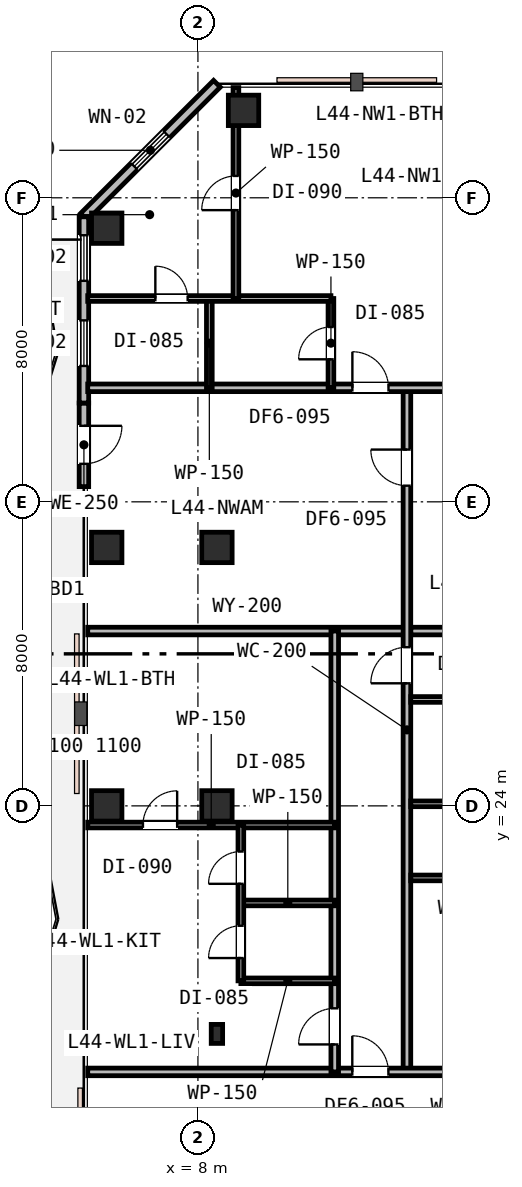
"""IFC4 building model, lengths in metres.
Left out: names, types, materials, properties, quantities, classifications, styles, units other than length and angle.
Written with IfcOpenShell. Run it as: python <this file> out.ifc"""

import sys

from ifc_helpers import new_model, si_unit, direction, frame, frame_2d, origin, origin_2d, place, context, subcontext, project, spatial, rectangle, i_section, extrude, element, fill, save


model = new_model("IFC4")
c1 = context("Model", 3, precision=1e-05, world=origin(), true_north=direction((0.0, 1.0)))
c2 = subcontext(c1, "Body", "Model", "MODEL_VIEW")
j1 = project(units=[si_unit("LENGTHUNIT", "METRE"), si_unit("PLANEANGLEUNIT", "RADIAN")], contexts=[c1])
p1 = place(None, origin())
s1 = spatial("IfcSite", under=j1, at=p1, CompositionType="ELEMENT")
p2 = place(p1, origin())
s2 = spatial("IfcBuilding", under=s1, at=p2, CompositionType="ELEMENT")
p3 = place(p2, frame((0.0, 0.0, 172.2)))
s3 = spatial("IfcBuildingStorey", under=s2, at=p3, CompositionType="ELEMENT", Elevation=172.2)
for number, where, z_axis, x_axis in (
    (1, (8.5, 24.0, 0.0), (0.0, 0.0, 1.0), (1.0, 0.0, 0.0)),
    (2, (5.6, 24.0, 0.0), (0.0, 0.0, 1.0), (1.0, 0.0, 0.0)),
    (3, (5.6, 30.8, 0.0), (0.0, 0.0, 1.0), (1.0, 0.0, 0.0)),
    (4, (5.6, 39.2, 0.0), (0.0, 0.0, 1.0), (1.0, 0.0, 0.0)),
    (5, (8.5, 30.8, 0.0), (0.0, 0.0, 1.0), (1.0, 0.0, 0.0)),
    (6, (9.2, 42.3, 0.0), (0.0, 0.0, 1.0), (1.0, 0.0, 0.0)),
):
    element("IfcColumn", number, at=place(p3, frame(where, z_axis=z_axis, x_axis=x_axis)), inside=s3, PredefinedType="COLUMN", context=c2, shape_type="SweptSolid", body=[
        extrude(rectangle(XDim=0.8, YDim=0.8, at=origin_2d()), origin(), (0.0, 0.0, 1.0), 3.6),
    ])
p4 = place(p3, frame((8.5, 18.0, 0.0), z_axis=(0.0, 0.0, 1.0), x_axis=(1.0, 0.0, 0.0)))
e7 = element("IfcColumn", 7, at=p4, inside=s3, PredefinedType="COLUMN", context=c2, shape_type="SweptSolid", body=[
    extrude(i_section(OverallWidth=0.3, OverallDepth=0.5, WebThickness=0.015, FlangeThickness=0.028, FilletRadius=0.027, at=origin_2d()), origin(), (0.0, 0.0, 1.0), 3.6),
])
p5 = place(p3, frame((8.5, 43.0, 0.0), z_axis=(0.0, 0.0, 1.0), x_axis=(-0.707106781187, -0.707106781187, 0.0)))
e8 = element("IfcWall", 8, at=p5, inside=s3, PredefinedType="STANDARD", context=c2, shape_type="SweptSolid", body=[
    extrude(rectangle(XDim=4.95, YDim=0.25, at=frame_2d((2.475, 0.0))), origin(), (0.0, 0.0, 1.0), 3.33),
])
p6 = place(p5, frame((1.875, 0.0, 0.85)))
e9 = element("IfcOpeningElement", 9, at=p6, cuts=e8, PredefinedType="OPENING", context=c2, shape_type="SweptSolid", body=[
    extrude(rectangle(XDim=1.2, YDim=1.6, at=frame_2d((0.6, 0.8))), frame((0.0, 0.135, 0.0), z_axis=(0.0, -1.0, 0.0), x_axis=(1.0, 0.0, 0.0)), (0.0, 0.0, 1.0), 0.27),
])
p7 = place(p3, frame((5.0, 34.6, 0.0), z_axis=(0.0, 0.0, 1.0), x_axis=(0.0, -1.0, 0.0)))
e10 = element("IfcWall", 10, at=p7, inside=s3, PredefinedType="STANDARD", context=c2, shape_type="SweptSolid", body=[
    extrude(rectangle(XDim=2.2, YDim=0.25, at=frame_2d((1.1, 0.0))), origin(), (0.0, 0.0, 1.0), 3.33),
])
p8 = place(p7, frame((0.6, 0.0, 0.0)))
e11 = element("IfcOpeningElement", 11, at=p8, cuts=e10, PredefinedType="OPENING", context=c2, shape_type="SweptSolid", body=[
    extrude(rectangle(XDim=1.0, YDim=2.15, at=frame_2d((0.5, 1.075))), frame((0.0, 0.135, 0.0), z_axis=(0.0, -1.0, 0.0), x_axis=(1.0, 0.0, 0.0)), (0.0, 0.0, 1.0), 0.27),
])
p9 = place(p3, frame((5.0, 39.5, 0.0), z_axis=(0.0, 0.0, 1.0), x_axis=(0.0, -1.0, 0.0)))
e12 = element("IfcWall", 12, at=p9, inside=s3, PredefinedType="STANDARD", context=c2, shape_type="SweptSolid", body=[
    extrude(rectangle(XDim=4.9, YDim=0.25, at=frame_2d((2.45, 0.0))), origin(), (0.0, 0.0, 1.0), 3.33),
])
p10 = place(p9, frame((0.485, 0.0, 0.85)))
e13 = element("IfcOpeningElement", 13, at=p10, cuts=e12, PredefinedType="OPENING", context=c2, shape_type="SweptSolid", body=[
    extrude(rectangle(XDim=1.2, YDim=1.6, at=frame_2d((0.6, 0.8))), frame((0.0, 0.135, 0.0), z_axis=(0.0, -1.0, 0.0), x_axis=(1.0, 0.0, 0.0)), (0.0, 0.0, 1.0), 0.27),
])
p11 = place(p9, frame((2.725, 0.0, 0.85)))
e14 = element("IfcOpeningElement", 14, at=p11, cuts=e12, PredefinedType="OPENING", context=c2, shape_type="SweptSolid", body=[
    extrude(rectangle(XDim=1.2, YDim=1.6, at=frame_2d((0.6, 0.8))), frame((0.0, 0.135, 0.0), z_axis=(0.0, -1.0, 0.0), x_axis=(1.0, 0.0, 0.0)), (0.0, 0.0, 1.0), 0.27),
])
p12 = place(p3, frame((5.1, 28.6, 0.0), z_axis=(0.0, 0.0, 1.0), x_axis=(1.0, 0.0, 0.0)))
e15 = element("IfcWall", 15, at=p12, inside=s3, PredefinedType="PARTITIONING", context=c2, shape_type="SweptSolid", body=[
    extrude(rectangle(XDim=8.4, YDim=0.2, at=frame_2d((4.2, 0.0))), origin(), (0.0, 0.0, 1.0), 2.92),
])
p13 = place(p3, frame((13.6, 28.6, 0.0), z_axis=(0.0, 0.0, 1.0), x_axis=(1.0, 0.0, 0.0)))
e16 = element("IfcWall", 16, at=p13, inside=s3, PredefinedType="PARTITIONING", context=c2, shape_type="SweptSolid", body=[
    extrude(rectangle(XDim=37.3, YDim=0.2, at=frame_2d((18.65, 0.0))), origin(), (0.0, 0.0, 1.0), 2.92),
])
p14 = place(p13, frame((16.025, 0.0, 0.0)))
e17 = element("IfcOpeningElement", 17, at=p14, cuts=e16, PredefinedType="OPENING", context=c2, shape_type="SweptSolid", body=[
    extrude(rectangle(XDim=0.95, YDim=2.15, at=frame_2d((0.475, 1.075))), frame((0.0, 0.11, 0.0), z_axis=(0.0, -1.0, 0.0), x_axis=(1.0, 0.0, 0.0)), (0.0, 0.0, 1.0), 0.22),
])
p15 = place(p13, frame((25.925, 0.0, 0.0)))
e18 = element("IfcOpeningElement", 18, at=p15, cuts=e16, PredefinedType="OPENING", context=c2, shape_type="SweptSolid", body=[
    extrude(rectangle(XDim=0.95, YDim=2.15, at=frame_2d((0.475, 1.075))), frame((0.0, 0.11, 0.0), z_axis=(0.0, -1.0, 0.0), x_axis=(1.0, 0.0, 0.0)), (0.0, 0.0, 1.0), 0.22),
])
p16 = place(p3, frame((13.5, 17.0, 0.0), z_axis=(0.0, 0.0, 1.0), x_axis=(0.0, 1.0, 0.0)))
e19 = element("IfcWall", 19, at=p16, inside=s3, PredefinedType="PARTITIONING", context=c2, shape_type="SweptSolid", body=[
    extrude(rectangle(XDim=18.0, YDim=0.2, at=frame_2d((9.0, 0.0))), origin(), (0.0, 0.0, 1.0), 2.92),
])
p17 = place(p16, frame((15.425, 0.0, 0.0)))
e20 = element("IfcOpeningElement", 20, at=p17, cuts=e19, PredefinedType="OPENING", context=c2, shape_type="SweptSolid", body=[
    extrude(rectangle(XDim=0.95, YDim=2.15, at=frame_2d((0.475, 1.075))), frame((0.0, 0.11, 0.0), z_axis=(0.0, -1.0, 0.0), x_axis=(1.0, 0.0, 0.0)), (0.0, 0.0, 1.0), 0.22),
])
p18 = place(p16, frame((10.225, 0.0, 0.0)))
e21 = element("IfcOpeningElement", 21, at=p18, cuts=e19, PredefinedType="OPENING", context=c2, shape_type="SweptSolid", body=[
    extrude(rectangle(XDim=0.95, YDim=2.15, at=frame_2d((0.475, 1.075))), frame((0.0, 0.11, 0.0), z_axis=(0.0, -1.0, 0.0), x_axis=(1.0, 0.0, 0.0)), (0.0, 0.0, 1.0), 0.22),
])
p19 = place(p3, frame((5.1, 35.0, 0.0), z_axis=(0.0, 0.0, 1.0), x_axis=(1.0, 0.0, 0.0)))
e22 = element("IfcWall", 22, at=p19, inside=s3, PredefinedType="PARTITIONING", context=c2, shape_type="SweptSolid", body=[
    extrude(rectangle(XDim=10.8, YDim=0.2, at=frame_2d((5.4, 0.0))), origin(), (0.0, 0.0, 1.0), 3.02),
])
p20 = place(p19, frame((6.964, 0.0, 0.0)))
e23 = element("IfcOpeningElement", 23, at=p20, cuts=e22, PredefinedType="OPENING", context=c2, shape_type="SweptSolid", body=[
    extrude(rectangle(XDim=0.95, YDim=2.15, at=frame_2d((0.475, 1.075))), frame((0.0, 0.11, 0.0), z_axis=(0.0, -1.0, 0.0), x_axis=(1.0, 0.0, 0.0)), (0.0, 0.0, 1.0), 0.22),
])
p21 = place(p3, frame((11.5, 35.0, 0.0), z_axis=(0.0, 0.0, 1.0), x_axis=(0.0, 1.0, 0.0)))
e24 = element("IfcWall", 24, at=p21, inside=s3, PredefinedType="PARTITIONING", context=c2, shape_type="SweptSolid", body=[
    extrude(rectangle(XDim=2.35, YDim=0.15, at=frame_2d((1.175, 0.0))), origin(), (0.0, 0.0, 1.0), 3.33),
])
p22 = place(p21, frame((0.75, 0.0, 0.0)))
e25 = element("IfcOpeningElement", 25, at=p22, cuts=e24, PredefinedType="OPENING", context=c2, shape_type="SweptSolid", body=[
    extrude(rectangle(XDim=0.85, YDim=2.15, at=frame_2d((0.425, 1.075))), frame((0.0, 0.085, 0.0), z_axis=(0.0, -1.0, 0.0), x_axis=(1.0, 0.0, 0.0)), (0.0, 0.0, 1.0), 0.17),
])
p23 = place(p3, frame((8.3, 35.0, 0.0), z_axis=(0.0, 0.0, 1.0), x_axis=(0.0, 1.0, 0.0)))
e26 = element("IfcWall", 26, at=p23, inside=s3, PredefinedType="PARTITIONING", context=c2, shape_type="SweptSolid", body=[
    extrude(rectangle(XDim=2.35, YDim=0.15, at=frame_2d((1.175, 0.0))), origin(), (0.0, 0.0, 1.0), 3.33),
])
p24 = place(p3, frame((5.1, 37.35, 0.0), z_axis=(0.0, 0.0, 1.0), x_axis=(1.0, 0.0, 0.0)))
e27 = element("IfcWall", 27, at=p24, inside=s3, PredefinedType="PARTITIONING", context=c2, shape_type="SweptSolid", body=[
    extrude(rectangle(XDim=6.4, YDim=0.15, at=frame_2d((3.2, 0.0))), origin(), (0.0, 0.0, 1.0), 3.02),
])
p25 = place(p24, frame((1.78, 0.0, 0.0)))
e28 = element("IfcOpeningElement", 28, at=p25, cuts=e27, PredefinedType="OPENING", context=c2, shape_type="SweptSolid", body=[
    extrude(rectangle(XDim=0.85, YDim=2.15, at=frame_2d((0.425, 1.075))), frame((0.0, 0.085, 0.0), z_axis=(0.0, -1.0, 0.0), x_axis=(1.0, 0.0, 0.0)), (0.0, 0.0, 1.0), 0.17),
])
p26 = place(p3, frame((9.0, 37.35, 0.0), z_axis=(0.0, 0.0, 1.0), x_axis=(0.0, 1.0, 0.0)))
e29 = element("IfcWall", 29, at=p26, inside=s3, PredefinedType="PARTITIONING", context=c2, shape_type="SweptSolid", body=[
    extrude(rectangle(XDim=5.55, YDim=0.15, at=frame_2d((2.775, 0.0))), origin(), (0.0, 0.0, 1.0), 3.02),
])
p27 = place(p26, frame((2.325, 0.0, 0.0)))
e30 = element("IfcOpeningElement", 30, at=p27, cuts=e29, PredefinedType="OPENING", context=c2, shape_type="SweptSolid", body=[
    extrude(rectangle(XDim=0.9, YDim=2.15, at=frame_2d((0.45, 1.075))), frame((0.0, 0.085, 0.0), z_axis=(0.0, -1.0, 0.0), x_axis=(1.0, 0.0, 0.0)), (0.0, 0.0, 1.0), 0.17),
])
p28 = place(p3, frame((5.1, 17.0, 0.0), z_axis=(0.0, 0.0, 1.0), x_axis=(1.0, 0.0, 0.0)))
e31 = element("IfcWall", 31, at=p28, inside=s3, PredefinedType="PARTITIONING", context=c2, shape_type="SweptSolid", body=[
    extrude(rectangle(XDim=18.8, YDim=0.2, at=frame_2d((9.4, 0.0))), origin(), (0.0, 0.0, 1.0), 2.92),
])
p29 = place(p28, frame((6.962, 0.0, 0.0)))
e32 = element("IfcOpeningElement", 32, at=p29, cuts=e31, PredefinedType="OPENING", context=c2, shape_type="SweptSolid", body=[
    extrude(rectangle(XDim=0.95, YDim=2.15, at=frame_2d((0.475, 1.075))), frame((0.0, 0.11, 0.0), z_axis=(0.0, -1.0, 0.0), x_axis=(1.0, 0.0, 0.0)), (0.0, 0.0, 1.0), 0.22),
])
p30 = place(p3, frame((11.6, 17.0, 0.0), z_axis=(0.0, 0.0, 1.0), x_axis=(0.0, 1.0, 0.0)))
e33 = element("IfcWall", 33, at=p30, inside=s3, PredefinedType="PARTITIONING", context=c2, shape_type="SweptSolid", body=[
    extrude(rectangle(XDim=11.6, YDim=0.2, at=frame_2d((5.8, 0.0))), origin(), (0.0, 0.0, 1.0), 2.92),
])
p31 = place(p30, frame((0.723, 0.0, 0.0)))
e34 = element("IfcOpeningElement", 34, at=p31, cuts=e33, PredefinedType="OPENING", context=c2, shape_type="SweptSolid", body=[
    extrude(rectangle(XDim=0.95, YDim=2.15, at=frame_2d((0.475, 1.075))), frame((0.0, 0.11, 0.0), z_axis=(0.0, -1.0, 0.0), x_axis=(1.0, 0.0, 0.0)), (0.0, 0.0, 1.0), 0.22),
])
for number, where, z_axis, x_axis in (
    (35, (9.13, 19.396, 0.0), (0.0, 0.0, 1.0), (1.0, 0.0, 0.0)),
    (36, (9.13, 21.446, 0.0), (0.0, 0.0, 1.0), (1.0, 0.0, 0.0)),
):
    element("IfcWall", number, at=place(p3, frame(where, z_axis=z_axis, x_axis=x_axis)), inside=s3, PredefinedType="PARTITIONING", context=c2, shape_type="SweptSolid", body=[
        extrude(rectangle(XDim=2.47, YDim=0.15, at=frame_2d((1.235, 0.0))), origin(), (0.0, 0.0, 1.0), 3.33),
    ])
p32 = place(p3, frame((5.1, 23.496, 0.0), z_axis=(0.0, 0.0, 1.0), x_axis=(1.0, 0.0, 0.0)))
e37 = element("IfcWall", 37, at=p32, inside=s3, PredefinedType="PARTITIONING", context=c2, shape_type="SweptSolid", body=[
    extrude(rectangle(XDim=6.5, YDim=0.15, at=frame_2d((3.25, 0.0))), origin(), (0.0, 0.0, 1.0), 2.92),
])
p33 = place(p32, frame((1.453, 0.0, 0.0)))
e38 = element("IfcOpeningElement", 38, at=p33, cuts=e37, PredefinedType="OPENING", context=c2, shape_type="SweptSolid", body=[
    extrude(rectangle(XDim=0.9, YDim=2.15, at=frame_2d((0.45, 1.075))), frame((0.0, 0.085, 0.0), z_axis=(0.0, -1.0, 0.0), x_axis=(1.0, 0.0, 0.0)), (0.0, 0.0, 1.0), 0.17),
])
p34 = place(p3, frame((9.13, 19.396, 0.0), z_axis=(0.0, 0.0, 1.0), x_axis=(0.0, 1.0, 0.0)))
e39 = element("IfcWall", 39, at=p34, inside=s3, PredefinedType="PARTITIONING", context=c2, shape_type="SweptSolid", body=[
    extrude(rectangle(XDim=4.1, YDim=0.15, at=frame_2d((2.05, 0.0))), origin(), (0.0, 0.0, 1.0), 2.92),
])
p35 = place(p34, frame((0.6, 0.0, 0.0)))
e40 = element("IfcOpeningElement", 40, at=p35, cuts=e39, PredefinedType="OPENING", context=c2, shape_type="SweptSolid", body=[
    extrude(rectangle(XDim=0.85, YDim=2.15, at=frame_2d((0.425, 1.075))), frame((0.0, 0.085, 0.0), z_axis=(0.0, -1.0, 0.0), x_axis=(1.0, 0.0, 0.0)), (0.0, 0.0, 1.0), 0.17),
])
p36 = place(p34, frame((2.553, 0.0, 0.0)))
e41 = element("IfcOpeningElement", 41, at=p36, cuts=e39, PredefinedType="OPENING", context=c2, shape_type="SweptSolid", body=[
    extrude(rectangle(XDim=0.85, YDim=2.15, at=frame_2d((0.425, 1.075))), frame((0.0, 0.085, 0.0), z_axis=(0.0, -1.0, 0.0), x_axis=(1.0, 0.0, 0.0)), (0.0, 0.0, 1.0), 0.17),
])
p37 = place(p3, frame((13.6, 22.104, 0.0), z_axis=(0.0, 0.0, 1.0), x_axis=(1.0, 0.0, 0.0)))
e42 = element("IfcWall", 42, at=p37, inside=s3, PredefinedType="PARTITIONING", context=c2, shape_type="SweptSolid", body=[
    extrude(rectangle(XDim=10.3, YDim=0.15, at=frame_2d((5.15, 0.0))), origin(), (0.0, 0.0, 1.0), 2.92),
])
p38 = place(p37, frame((6.325, 0.0, 0.0)))
e43 = element("IfcOpeningElement", 43, at=p38, cuts=e42, PredefinedType="OPENING", context=c2, shape_type="SweptSolid", body=[
    extrude(rectangle(XDim=0.9, YDim=2.15, at=frame_2d((0.45, 1.075))), frame((0.0, 0.085, 0.0), z_axis=(0.0, -1.0, 0.0), x_axis=(1.0, 0.0, 0.0)), (0.0, 0.0, 1.0), 0.17),
])
for number, where, z_axis, x_axis in (
    (44, (13.6, 24.054, 0.0), (0.0, 0.0, 1.0), (1.0, 0.0, 0.0)),
    (45, (13.6, 26.8, 0.0), (0.0, 0.0, 1.0), (1.0, 0.0, 0.0)),
):
    element("IfcWall", number, at=place(p3, frame(where, z_axis=z_axis, x_axis=x_axis)), inside=s3, PredefinedType="PARTITIONING", context=c2, shape_type="SweptSolid", body=[
        extrude(rectangle(XDim=3.25, YDim=0.15, at=frame_2d((1.625, 0.0))), origin(), (0.0, 0.0, 1.0), 2.92),
    ])
p39 = place(p6, origin())
e46 = element("IfcWindow", 46, at=p39, inside=s3, PartitioningType="SINGLE_PANEL", PredefinedType="WINDOW", context=c2, shape_type="SweptSolid", body=[
    extrude(rectangle(XDim=1.2, YDim=1.6, at=frame_2d((0.6, 0.8))), frame((0.0, 0.03, 0.0), z_axis=(0.0, -1.0, 0.0), x_axis=(1.0, 0.0, 0.0)), (0.0, 0.0, 1.0), 0.06),
])
fill(e9, e46)
p40 = place(p8, origin())
e47 = element("IfcDoor", 47, at=p40, inside=s3, OperationType="SINGLE_SWING_LEFT", PredefinedType="DOOR", context=c2, shape_type="SweptSolid", body=[
    extrude(rectangle(XDim=1.0, YDim=2.15, at=frame_2d((0.5, 1.075))), frame((0.0, 0.025, 0.0), z_axis=(0.0, -1.0, 0.0), x_axis=(1.0, 0.0, 0.0)), (0.0, 0.0, 1.0), 0.05),
])
fill(e11, e47)
p41 = place(p10, origin())
e48 = element("IfcWindow", 48, at=p41, inside=s3, PartitioningType="SINGLE_PANEL", PredefinedType="WINDOW", context=c2, shape_type="SweptSolid", body=[
    extrude(rectangle(XDim=1.2, YDim=1.6, at=frame_2d((0.6, 0.8))), frame((0.0, 0.03, 0.0), z_axis=(0.0, -1.0, 0.0), x_axis=(1.0, 0.0, 0.0)), (0.0, 0.0, 1.0), 0.06),
])
fill(e13, e48)
p42 = place(p11, origin())
e49 = element("IfcWindow", 49, at=p42, inside=s3, PartitioningType="SINGLE_PANEL", PredefinedType="WINDOW", context=c2, shape_type="SweptSolid", body=[
    extrude(rectangle(XDim=1.2, YDim=1.6, at=frame_2d((0.6, 0.8))), frame((0.0, 0.03, 0.0), z_axis=(0.0, -1.0, 0.0), x_axis=(1.0, 0.0, 0.0)), (0.0, 0.0, 1.0), 0.06),
])
fill(e14, e49)
p43 = place(p17, origin())
e50 = element("IfcDoor", 50, at=p43, inside=s3, OperationType="SINGLE_SWING_RIGHT", PredefinedType="DOOR", context=c2, shape_type="SweptSolid", body=[
    extrude(rectangle(XDim=0.95, YDim=2.15, at=frame_2d((0.475, 1.075))), frame((0.0, 0.025, 0.0), z_axis=(0.0, -1.0, 0.0), x_axis=(1.0, 0.0, 0.0)), (0.0, 0.0, 1.0), 0.05),
])
fill(e20, e50)
p44 = place(p20, origin())
e51 = element("IfcDoor", 51, at=p44, inside=s3, OperationType="SINGLE_SWING_LEFT", PredefinedType="DOOR", context=c2, shape_type="SweptSolid", body=[
    extrude(rectangle(XDim=0.95, YDim=2.15, at=frame_2d((0.475, 1.075))), frame((0.0, 0.025, 0.0), z_axis=(0.0, -1.0, 0.0), x_axis=(1.0, 0.0, 0.0)), (0.0, 0.0, 1.0), 0.05),
])
fill(e23, e51)
p45 = place(p22, origin())
e52 = element("IfcDoor", 52, at=p45, inside=s3, OperationType="SINGLE_SWING_LEFT", PredefinedType="DOOR", context=c2, shape_type="SweptSolid", body=[
    extrude(rectangle(XDim=0.85, YDim=2.15, at=frame_2d((0.425, 1.075))), frame((0.0, 0.025, 0.0), z_axis=(0.0, -1.0, 0.0), x_axis=(1.0, 0.0, 0.0)), (0.0, 0.0, 1.0), 0.05),
])
fill(e25, e52)
p46 = place(p25, origin())
e53 = element("IfcDoor", 53, at=p46, inside=s3, OperationType="SINGLE_SWING_LEFT", PredefinedType="DOOR", context=c2, shape_type="SweptSolid", body=[
    extrude(rectangle(XDim=0.85, YDim=2.15, at=frame_2d((0.425, 1.075))), frame((0.0, 0.025, 0.0), z_axis=(0.0, -1.0, 0.0), x_axis=(1.0, 0.0, 0.0)), (0.0, 0.0, 1.0), 0.05),
])
fill(e28, e53)
p47 = place(p27, origin())
e54 = element("IfcDoor", 54, at=p47, inside=s3, OperationType="SINGLE_SWING_LEFT", PredefinedType="DOOR", context=c2, shape_type="SweptSolid", body=[
    extrude(rectangle(XDim=0.9, YDim=2.15, at=frame_2d((0.45, 1.075))), frame((0.0, 0.025, 0.0), z_axis=(0.0, -1.0, 0.0), x_axis=(1.0, 0.0, 0.0)), (0.0, 0.0, 1.0), 0.05),
])
fill(e30, e54)
p48 = place(p31, origin())
e55 = element("IfcDoor", 55, at=p48, inside=s3, OperationType="SINGLE_SWING_LEFT", PredefinedType="DOOR", context=c2, shape_type="SweptSolid", body=[
    extrude(rectangle(XDim=0.95, YDim=2.15, at=frame_2d((0.475, 1.075))), frame((0.0, 0.025, 0.0), z_axis=(0.0, -1.0, 0.0), x_axis=(1.0, 0.0, 0.0)), (0.0, 0.0, 1.0), 0.05),
])
fill(e34, e55)
p49 = place(p35, origin())
e56 = element("IfcDoor", 56, at=p49, inside=s3, OperationType="SINGLE_SWING_LEFT", PredefinedType="DOOR", context=c2, shape_type="SweptSolid", body=[
    extrude(rectangle(XDim=0.85, YDim=2.15, at=frame_2d((0.425, 1.075))), frame((0.0, 0.025, 0.0), z_axis=(0.0, -1.0, 0.0), x_axis=(1.0, 0.0, 0.0)), (0.0, 0.0, 1.0), 0.05),
])
fill(e40, e56)
p50 = place(p36, origin())
e57 = element("IfcDoor", 57, at=p50, inside=s3, OperationType="SINGLE_SWING_LEFT", PredefinedType="DOOR", context=c2, shape_type="SweptSolid", body=[
    extrude(rectangle(XDim=0.85, YDim=2.15, at=frame_2d((0.425, 1.075))), frame((0.0, 0.025, 0.0), z_axis=(0.0, -1.0, 0.0), x_axis=(1.0, 0.0, 0.0)), (0.0, 0.0, 1.0), 0.05),
])
fill(e41, e57)
p51 = place(p33, origin())
e58 = element("IfcDoor", 58, at=p51, inside=s3, OperationType="SINGLE_SWING_RIGHT", PredefinedType="DOOR", context=c2, shape_type="SweptSolid", body=[
    extrude(rectangle(XDim=0.9, YDim=2.15, at=frame_2d((0.45, 1.075))), frame((0.0, 0.025, 0.0), z_axis=(0.0, -1.0, 0.0), x_axis=(1.0, 0.0, 0.0)), (0.0, 0.0, 1.0), 0.05),
])
fill(e38, e58)
p52 = place(p18, origin())
e59 = element("IfcDoor", 59, at=p52, inside=s3, OperationType="SINGLE_SWING_LEFT", PredefinedType="DOOR", context=c2, shape_type="SweptSolid", body=[
    extrude(rectangle(XDim=0.95, YDim=2.15, at=frame_2d((0.475, 1.075))), frame((0.0, 0.025, 0.0), z_axis=(0.0, -1.0, 0.0), x_axis=(1.0, 0.0, 0.0)), (0.0, 0.0, 1.0), 0.05),
])
fill(e21, e59)
p53 = place(p29, origin())
e60 = element("IfcDoor", 60, at=p53, inside=s3, OperationType="SINGLE_SWING_LEFT", PredefinedType="DOOR", context=c2, shape_type="SweptSolid", body=[
    extrude(rectangle(XDim=0.95, YDim=2.15, at=frame_2d((0.475, 1.075))), frame((0.0, 0.025, 0.0), z_axis=(0.0, -1.0, 0.0), x_axis=(1.0, 0.0, 0.0)), (0.0, 0.0, 1.0), 0.05),
])
fill(e32, e60)
save(model, sys.argv[1])
